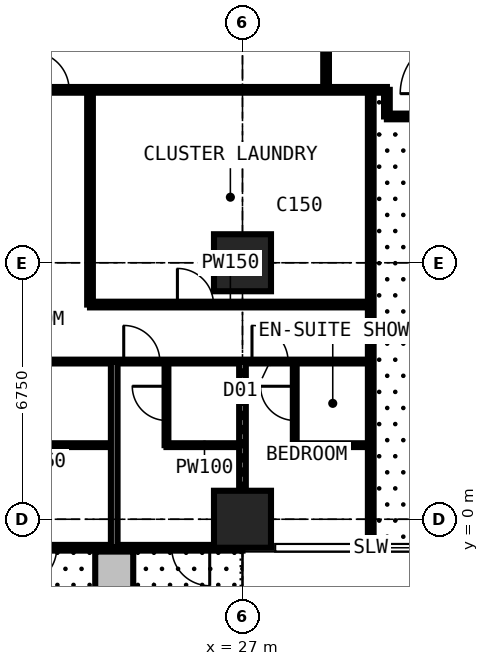
"""IFC4 building model, lengths in metres.
Left out: names, types, materials, properties, quantities, classifications, styles, units other than length and angle.
Written with IfcOpenShell. Run it as: python <this file> out.ifc"""

import sys

from ifc_helpers import new_model, si_unit, direction, frame, frame_2d, origin, origin_2d, place, context, subcontext, project, spatial, rectangle, extrude, element, fill, save


model = new_model("IFC4")
c1 = context("Model", 3, precision=1e-05, world=origin(), true_north=direction((0.0, 1.0)))
c2 = subcontext(c1, "Body", "Model", "MODEL_VIEW")
j1 = project(units=[si_unit("LENGTHUNIT", "METRE"), si_unit("PLANEANGLEUNIT", "RADIAN")], contexts=[c1])
p1 = place(None, origin())
s1 = spatial("IfcSite", under=j1, at=p1, CompositionType="ELEMENT")
p2 = place(p1, origin())
s2 = spatial("IfcBuilding", under=s1, at=p2, CompositionType="ELEMENT")
p3 = place(p2, frame((0.0, 0.0, 108.9)))
s3 = spatial("IfcBuildingStorey", under=s2, at=p3, CompositionType="ELEMENT", Elevation=108.9)
for number, where, z_axis, x_axis in (
    (1, (27.0, 0.0, 0.0), (0.0, 0.0, 1.0), (1.0, 0.0, 0.0)),
    (2, (27.0, 6.75, 0.0), (0.0, 0.0, 1.0), (1.0, 0.0, 0.0)),
):
    element("IfcColumn", number, at=place(p3, frame(where, z_axis=z_axis, x_axis=x_axis)), inside=s3, PredefinedType="COLUMN", context=c2, shape_type="SweptSolid", body=[
        extrude(rectangle(XDim=1.5, YDim=1.5, at=origin_2d()), origin(), (0.0, 0.0, 1.0), 3.6),
    ])
p4 = place(p3, frame((27.0, -0.75, 0.0), z_axis=(0.0, 0.0, 1.0), x_axis=(-1.0, 0.0, 0.0)))
e3 = element("IfcWall", 3, at=p4, inside=s3, PredefinedType="SOLIDWALL", context=c2, shape_type="SweptSolid", body=[
    extrude(rectangle(XDim=6.75, YDim=0.15, at=frame_2d((3.375, 0.0))), origin(), (0.0, 0.0, 1.0), 3.375),
])
p5 = place(p4, frame((0.863, 0.0, 0.0)))
e4 = element("IfcOpeningElement", 4, at=p5, cuts=e3, PredefinedType="OPENING", context=c2, shape_type="SweptSolid", body=[
    extrude(rectangle(XDim=1.0, YDim=2.2, at=frame_2d((0.5, 1.1))), frame((0.0, 0.085, 0.0), z_axis=(0.0, -1.0, 0.0), x_axis=(1.0, 0.0, 0.0)), (0.0, 0.0, 1.0), 0.17),
])
p6 = place(p4, frame((1.975, 0.0, 0.9)))
e5 = element("IfcOpeningElement", 5, at=p6, cuts=e3, PredefinedType="OPENING", context=c2, shape_type="SweptSolid", body=[
    extrude(rectangle(XDim=1.2, YDim=1.8, at=frame_2d((0.6, 0.9))), frame((0.0, 0.085, 0.0), z_axis=(0.0, -1.0, 0.0), x_axis=(1.0, 0.0, 0.0)), (0.0, 0.0, 1.0), 0.17),
])
p7 = place(p4, frame((4.887, 0.0, 0.0)))
e6 = element("IfcOpeningElement", 6, at=p7, cuts=e3, PredefinedType="OPENING", context=c2, shape_type="SweptSolid", body=[
    extrude(rectangle(XDim=1.0, YDim=2.2, at=frame_2d((0.5, 1.1))), frame((0.0, 0.085, 0.0), z_axis=(0.0, -1.0, 0.0), x_axis=(1.0, 0.0, 0.0)), (0.0, 0.0, 1.0), 0.17),
])
p8 = place(p4, frame((3.575, 0.0, 0.9)))
e7 = element("IfcOpeningElement", 7, at=p8, cuts=e3, PredefinedType="OPENING", context=c2, shape_type="SweptSolid", body=[
    extrude(rectangle(XDim=1.2, YDim=1.8, at=frame_2d((0.6, 0.9))), frame((0.0, 0.085, 0.0), z_axis=(0.0, -1.0, 0.0), x_axis=(1.0, 0.0, 0.0)), (0.0, 0.0, 1.0), 0.17),
])
p9 = place(p3, frame((23.625, -0.85, 0.0), z_axis=(0.0, 0.0, 1.0), x_axis=(0.0, -1.0, 0.0)))
e8 = element("IfcWall", 8, at=p9, inside=s3, PredefinedType="USERDEFINED", context=c2, shape_type="SweptSolid", body=[
    extrude(rectangle(XDim=2.2, YDim=1.0, at=frame_2d((1.1, 0.0))), origin(), (0.0, 0.0, 1.0), 0.9),
])
p10 = place(p3, frame((6.75, 4.15, 0.0), z_axis=(0.0, 0.0, 1.0), x_axis=(1.0, 0.0, 0.0)))
e9 = element("IfcWall", 9, at=p10, inside=s3, PredefinedType="PARTITIONING", context=c2, shape_type="SweptSolid", body=[
    extrude(rectangle(XDim=23.625, YDim=0.1, at=frame_2d((11.812, 0.0))), origin(), (0.0, 0.0, 1.0), 3.375),
])
p11 = place(p10, frame((0.2, 0.0, 0.0)))
e10 = element("IfcOpeningElement", 10, at=p11, cuts=e9, PredefinedType="OPENING", context=c2, shape_type="SweptSolid", body=[
    extrude(rectangle(XDim=0.95, YDim=2.2, at=frame_2d((0.475, 1.1))), frame((0.0, 0.06, 0.0), z_axis=(0.0, -1.0, 0.0), x_axis=(1.0, 0.0, 0.0)), (0.0, 0.0, 1.0), 0.12),
])
p12 = place(p10, frame((3.625, 0.0, 0.0)))
e11 = element("IfcOpeningElement", 11, at=p12, cuts=e9, PredefinedType="OPENING", context=c2, shape_type="SweptSolid", body=[
    extrude(rectangle(XDim=0.95, YDim=2.2, at=frame_2d((0.475, 1.1))), frame((0.0, 0.06, 0.0), z_axis=(0.0, -1.0, 0.0), x_axis=(1.0, 0.0, 0.0)), (0.0, 0.0, 1.0), 0.12),
])
p13 = place(p10, frame((7.0, 0.0, 0.0)))
e12 = element("IfcOpeningElement", 12, at=p13, cuts=e9, PredefinedType="OPENING", context=c2, shape_type="SweptSolid", body=[
    extrude(rectangle(XDim=0.95, YDim=2.2, at=frame_2d((0.475, 1.1))), frame((0.0, 0.06, 0.0), z_axis=(0.0, -1.0, 0.0), x_axis=(1.0, 0.0, 0.0)), (0.0, 0.0, 1.0), 0.12),
])
p14 = place(p10, frame((10.375, 0.0, 0.0)))
e13 = element("IfcOpeningElement", 13, at=p14, cuts=e9, PredefinedType="OPENING", context=c2, shape_type="SweptSolid", body=[
    extrude(rectangle(XDim=0.95, YDim=2.2, at=frame_2d((0.475, 1.1))), frame((0.0, 0.06, 0.0), z_axis=(0.0, -1.0, 0.0), x_axis=(1.0, 0.0, 0.0)), (0.0, 0.0, 1.0), 0.12),
])
p15 = place(p10, frame((13.75, 0.0, 0.0)))
e14 = element("IfcOpeningElement", 14, at=p15, cuts=e9, PredefinedType="OPENING", context=c2, shape_type="SweptSolid", body=[
    extrude(rectangle(XDim=0.95, YDim=2.2, at=frame_2d((0.475, 1.1))), frame((0.0, 0.06, 0.0), z_axis=(0.0, -1.0, 0.0), x_axis=(1.0, 0.0, 0.0)), (0.0, 0.0, 1.0), 0.12),
])
p16 = place(p10, frame((17.125, 0.0, 0.0)))
e15 = element("IfcOpeningElement", 15, at=p16, cuts=e9, PredefinedType="OPENING", context=c2, shape_type="SweptSolid", body=[
    extrude(rectangle(XDim=0.95, YDim=2.2, at=frame_2d((0.475, 1.1))), frame((0.0, 0.06, 0.0), z_axis=(0.0, -1.0, 0.0), x_axis=(1.0, 0.0, 0.0)), (0.0, 0.0, 1.0), 0.12),
])
p17 = place(p10, frame((20.5, 0.0, 0.0)))
e16 = element("IfcOpeningElement", 16, at=p17, cuts=e9, PredefinedType="OPENING", context=c2, shape_type="SweptSolid", body=[
    extrude(rectangle(XDim=0.95, YDim=2.2, at=frame_2d((0.475, 1.1))), frame((0.0, 0.06, 0.0), z_axis=(0.0, -1.0, 0.0), x_axis=(1.0, 0.0, 0.0)), (0.0, 0.0, 1.0), 0.12),
])
p18 = place(p3, frame((10.125, 11.3, 0.0), z_axis=(0.0, 0.0, 1.0), x_axis=(1.0, 0.0, 0.0)))
e17 = element("IfcWall", 17, at=p18, inside=s3, PredefinedType="PARTITIONING", context=c2, shape_type="SweptSolid", body=[
    extrude(rectangle(XDim=20.675, YDim=0.15, at=frame_2d((10.337, 0.0))), origin(), (0.0, 0.0, 1.0), 3.375),
])
p19 = place(p18, frame((11.312, 0.0, 0.0)))
e18 = element("IfcOpeningElement", 18, at=p19, cuts=e17, PredefinedType="OPENING", context=c2, shape_type="SweptSolid", body=[
    extrude(rectangle(XDim=1.0, YDim=2.2, at=frame_2d((0.5, 1.1))), frame((0.0, 0.085, 0.0), z_axis=(0.0, -1.0, 0.0), x_axis=(1.0, 0.0, 0.0)), (0.0, 0.0, 1.0), 0.17),
])
p20 = place(p3, frame((21.625, 1.95, 0.0), z_axis=(0.0, 0.0, 1.0), x_axis=(1.0, 0.0, 0.0)))
e19 = element("IfcWall", 19, at=p20, inside=s3, PredefinedType="PARTITIONING", context=c2, shape_type="SweptSolid", body=[
    extrude(rectangle(XDim=2.0, YDim=0.1, at=frame_2d((1.0, 0.0))), origin(), (0.0, 0.0, 1.0), 3.375),
])
p21 = place(p3, frame((22.988, 5.65, 0.0), z_axis=(0.0, 0.0, 1.0), x_axis=(1.0, 0.0, 0.0)))
e20 = element("IfcWall", 20, at=p21, inside=s3, PredefinedType="PARTITIONING", context=c2, shape_type="SweptSolid", body=[
    extrude(rectangle(XDim=7.387, YDim=0.15, at=frame_2d((3.694, 0.0))), origin(), (0.0, 0.0, 1.0), 3.375),
])
p22 = place(p21, frame((2.3, 0.0, 0.0)))
e21 = element("IfcOpeningElement", 21, at=p22, cuts=e20, PredefinedType="OPENING", context=c2, shape_type="SweptSolid", body=[
    extrude(rectangle(XDim=0.95, YDim=2.2, at=frame_2d((0.475, 1.1))), frame((0.0, 0.085, 0.0), z_axis=(0.0, -1.0, 0.0), x_axis=(1.0, 0.0, 0.0)), (0.0, 0.0, 1.0), 0.17),
])
p23 = place(p3, frame((22.988, 5.65, 0.0), z_axis=(0.0, 0.0, 1.0), x_axis=(0.0, 1.0, 0.0)))
e22 = element("IfcWall", 22, at=p23, inside=s3, PredefinedType="PARTITIONING", context=c2, shape_type="SweptSolid", body=[
    extrude(rectangle(XDim=5.65, YDim=0.15, at=frame_2d((2.825, 0.0))), origin(), (0.0, 0.0, 1.0), 3.375),
])
p24 = place(p3, frame((23.625, -0.734, 0.0), z_axis=(0.0, 0.0, 1.0), x_axis=(0.0, 1.0, 0.0)))
e23 = element("IfcWall", 23, at=p24, inside=s3, PredefinedType="PARTITIONING", context=c2, shape_type="SweptSolid", body=[
    extrude(rectangle(XDim=4.884, YDim=0.175, at=frame_2d((2.442, 0.0))), origin(), (0.0, 0.0, 1.0), 3.375),
])
p25 = place(p3, frame((25.0, 1.95, 0.0), z_axis=(0.0, 0.0, 1.0), x_axis=(0.0, 1.0, 0.0)))
e24 = element("IfcWall", 24, at=p25, inside=s3, PredefinedType="PARTITIONING", context=c2, shape_type="SweptSolid", body=[
    extrude(rectangle(XDim=2.2, YDim=0.1, at=frame_2d((1.1, 0.0))), origin(), (0.0, 0.0, 1.0), 3.375),
])
p26 = place(p25, frame((0.65, 0.0, 0.0)))
e25 = element("IfcOpeningElement", 25, at=p26, cuts=e24, PredefinedType="OPENING", context=c2, shape_type="SweptSolid", body=[
    extrude(rectangle(XDim=0.9, YDim=2.2, at=frame_2d((0.45, 1.1))), frame((0.0, 0.06, 0.0), z_axis=(0.0, -1.0, 0.0), x_axis=(1.0, 0.0, 0.0)), (0.0, 0.0, 1.0), 0.12),
])
p27 = place(p3, frame((25.0, 1.95, 0.0), z_axis=(0.0, 0.0, 1.0), x_axis=(1.0, 0.0, 0.0)))
e26 = element("IfcWall", 26, at=p27, inside=s3, PredefinedType="PARTITIONING", context=c2, shape_type="SweptSolid", body=[
    extrude(rectangle(XDim=2.0, YDim=0.1, at=frame_2d((1.0, 0.0))), origin(), (0.0, 0.0, 1.0), 3.375),
])
p28 = place(p3, frame((27.0, -0.734, 0.0), z_axis=(0.0, 0.0, 1.0), x_axis=(0.0, 1.0, 0.0)))
e27 = element("IfcWall", 27, at=p28, inside=s3, PredefinedType="PARTITIONING", context=c2, shape_type="SweptSolid", body=[
    extrude(rectangle(XDim=4.884, YDim=0.175, at=frame_2d((2.442, 0.0))), origin(), (0.0, 0.0, 1.0), 2.61),
])
p29 = place(p3, frame((28.375, 1.95, 0.0), z_axis=(0.0, 0.0, 1.0), x_axis=(0.0, 1.0, 0.0)))
e28 = element("IfcWall", 28, at=p29, inside=s3, PredefinedType="PARTITIONING", context=c2, shape_type="SweptSolid", body=[
    extrude(rectangle(XDim=2.2, YDim=0.1, at=frame_2d((1.1, 0.0))), origin(), (0.0, 0.0, 1.0), 3.375),
])
p30 = place(p29, frame((0.65, 0.0, 0.0)))
e29 = element("IfcOpeningElement", 29, at=p30, cuts=e28, PredefinedType="OPENING", context=c2, shape_type="SweptSolid", body=[
    extrude(rectangle(XDim=0.9, YDim=2.2, at=frame_2d((0.45, 1.1))), frame((0.0, 0.06, 0.0), z_axis=(0.0, -1.0, 0.0), x_axis=(1.0, 0.0, 0.0)), (0.0, 0.0, 1.0), 0.12),
])
p31 = place(p3, frame((28.375, 1.95, 0.0), z_axis=(0.0, 0.0, 1.0), x_axis=(1.0, 0.0, 0.0)))
e30 = element("IfcWall", 30, at=p31, inside=s3, PredefinedType="PARTITIONING", context=c2, shape_type="SweptSolid", body=[
    extrude(rectangle(XDim=2.0, YDim=0.1, at=frame_2d((1.0, 0.0))), origin(), (0.0, 0.0, 1.0), 3.375),
])
p32 = place(p3, frame((29.2, 11.3, 0.0), z_axis=(0.0, 0.0, 1.0), x_axis=(0.0, 1.0, 0.0)))
e31 = element("IfcWall", 31, at=p32, inside=s3, PredefinedType="PARTITIONING", context=c2, shape_type="SweptSolid", body=[
    extrude(rectangle(XDim=20.3, YDim=0.15, at=frame_2d((10.15, 0.0))), origin(), (0.0, 0.0, 1.0), 3.375),
])
p33 = place(p32, frame((8.35, 0.0, 0.0)))
e32 = element("IfcOpeningElement", 32, at=p33, cuts=e31, PredefinedType="OPENING", context=c2, shape_type="SweptSolid", body=[
    extrude(rectangle(XDim=1.2, YDim=2.2, at=frame_2d((0.6, 1.1))), frame((0.0, 0.085, 0.0), z_axis=(0.0, -1.0, 0.0), x_axis=(1.0, 0.0, 0.0)), (0.0, 0.0, 1.0), 0.17),
])
p34 = place(p3, frame((30.375, -0.734, 0.0), z_axis=(0.0, 0.0, 1.0), x_axis=(0.0, 1.0, 0.0)))
e33 = element("IfcWall", 33, at=p34, inside=s3, PredefinedType="PARTITIONING", context=c2, shape_type="SweptSolid", body=[
    extrude(rectangle(XDim=12.034, YDim=0.15, at=frame_2d((6.017, 0.0))), origin(), (0.0, 0.0, 1.0), 3.375),
])
p35 = place(p3, frame((30.8, 10.6, 0.0), z_axis=(0.0, 0.0, 1.0), x_axis=(0.0, 1.0, 0.0)))
e34 = element("IfcWall", 34, at=p35, inside=s3, PredefinedType="PARTITIONING", context=c2, shape_type="SweptSolid", body=[
    extrude(rectangle(XDim=0.7, YDim=0.15, at=frame_2d((0.35, 0.0))), origin(), (0.0, 0.0, 1.0), 3.375),
])
p36 = place(p3, frame((30.8, 10.6, 0.0), z_axis=(0.0, 0.0, 1.0), x_axis=(1.0, 0.0, 0.0)))
e35 = element("IfcWall", 35, at=p36, inside=s3, PredefinedType="PARTITIONING", context=c2, shape_type="SweptSolid", body=[
    extrude(rectangle(XDim=1.85, YDim=0.15, at=frame_2d((0.925, 0.0))), origin(), (0.0, 0.0, 1.0), 3.375),
])
p37 = place(p5, origin())
e36 = element("IfcDoor", 36, at=p37, inside=s3, OperationType="SINGLE_SWING_LEFT", PredefinedType="DOOR", context=c2, shape_type="SweptSolid", body=[
    extrude(rectangle(XDim=1.0, YDim=2.2, at=frame_2d((0.5, 1.1))), frame((0.0, 0.025, 0.0), z_axis=(0.0, -1.0, 0.0), x_axis=(1.0, 0.0, 0.0)), (0.0, 0.0, 1.0), 0.05),
])
fill(e4, e36)
p38 = place(p6, origin())
e37 = element("IfcWindow", 37, at=p38, inside=s3, PartitioningType="SINGLE_PANEL", PredefinedType="WINDOW", context=c2, shape_type="SweptSolid", body=[
    extrude(rectangle(XDim=1.2, YDim=1.8, at=frame_2d((0.6, 0.9))), frame((0.0, 0.03, 0.0), z_axis=(0.0, -1.0, 0.0), x_axis=(1.0, 0.0, 0.0)), (0.0, 0.0, 1.0), 0.06),
])
fill(e5, e37)
p39 = place(p7, origin())
e38 = element("IfcDoor", 38, at=p39, inside=s3, OperationType="SINGLE_SWING_RIGHT", PredefinedType="DOOR", context=c2, shape_type="SweptSolid", body=[
    extrude(rectangle(XDim=1.0, YDim=2.2, at=frame_2d((0.5, 1.1))), frame((0.0, 0.025, 0.0), z_axis=(0.0, -1.0, 0.0), x_axis=(1.0, 0.0, 0.0)), (0.0, 0.0, 1.0), 0.05),
])
fill(e6, e38)
p40 = place(p8, origin())
e39 = element("IfcWindow", 39, at=p40, inside=s3, PartitioningType="SINGLE_PANEL", PredefinedType="WINDOW", context=c2, shape_type="SweptSolid", body=[
    extrude(rectangle(XDim=1.2, YDim=1.8, at=frame_2d((0.6, 0.9))), frame((0.0, 0.03, 0.0), z_axis=(0.0, -1.0, 0.0), x_axis=(1.0, 0.0, 0.0)), (0.0, 0.0, 1.0), 0.06),
])
fill(e7, e39)
p41 = place(p16, origin())
e40 = element("IfcDoor", 40, at=p41, inside=s3, OperationType="SINGLE_SWING_LEFT", PredefinedType="DOOR", context=c2, shape_type="SweptSolid", body=[
    extrude(rectangle(XDim=0.95, YDim=2.2, at=frame_2d((0.475, 1.1))), frame((0.0, 0.025, 0.0), z_axis=(0.0, -1.0, 0.0), x_axis=(1.0, 0.0, 0.0)), (0.0, 0.0, 1.0), 0.05),
])
fill(e15, e40)
p42 = place(p26, origin())
e41 = element("IfcDoor", 41, at=p42, inside=s3, OperationType="SINGLE_SWING_RIGHT", PredefinedType="DOOR", context=c2, shape_type="SweptSolid", body=[
    extrude(rectangle(XDim=0.9, YDim=2.2, at=frame_2d((0.45, 1.1))), frame((0.0, 0.025, 0.0), z_axis=(0.0, -1.0, 0.0), x_axis=(1.0, 0.0, 0.0)), (0.0, 0.0, 1.0), 0.05),
])
fill(e25, e41)
p43 = place(p17, origin())
e42 = element("IfcDoor", 42, at=p43, inside=s3, OperationType="SINGLE_SWING_LEFT", PredefinedType="DOOR", context=c2, shape_type="SweptSolid", body=[
    extrude(rectangle(XDim=0.95, YDim=2.2, at=frame_2d((0.475, 1.1))), frame((0.0, 0.025, 0.0), z_axis=(0.0, -1.0, 0.0), x_axis=(1.0, 0.0, 0.0)), (0.0, 0.0, 1.0), 0.05),
])
fill(e16, e42)
p44 = place(p30, origin())
e43 = element("IfcDoor", 43, at=p44, inside=s3, OperationType="SINGLE_SWING_RIGHT", PredefinedType="DOOR", context=c2, shape_type="SweptSolid", body=[
    extrude(rectangle(XDim=0.9, YDim=2.2, at=frame_2d((0.45, 1.1))), frame((0.0, 0.025, 0.0), z_axis=(0.0, -1.0, 0.0), x_axis=(1.0, 0.0, 0.0)), (0.0, 0.0, 1.0), 0.05),
])
fill(e29, e43)
p45 = place(p19, origin())
e44 = element("IfcDoor", 44, at=p45, inside=s3, OperationType="SINGLE_SWING_LEFT", PredefinedType="DOOR", context=c2, shape_type="SweptSolid", body=[
    extrude(rectangle(XDim=1.0, YDim=2.2, at=frame_2d((0.5, 1.1))), frame((0.0, 0.025, 0.0), z_axis=(0.0, -1.0, 0.0), x_axis=(1.0, 0.0, 0.0)), (0.0, 0.0, 1.0), 0.05),
])
fill(e18, e44)
p46 = place(p22, origin())
e45 = element("IfcDoor", 45, at=p46, inside=s3, OperationType="SINGLE_SWING_LEFT", PredefinedType="DOOR", context=c2, shape_type="SweptSolid", body=[
    extrude(rectangle(XDim=0.95, YDim=2.2, at=frame_2d((0.475, 1.1))), frame((0.0, 0.025, 0.0), z_axis=(0.0, -1.0, 0.0), x_axis=(1.0, 0.0, 0.0)), (0.0, 0.0, 1.0), 0.05),
])
fill(e21, e45)
save(model, sys.argv[1])
